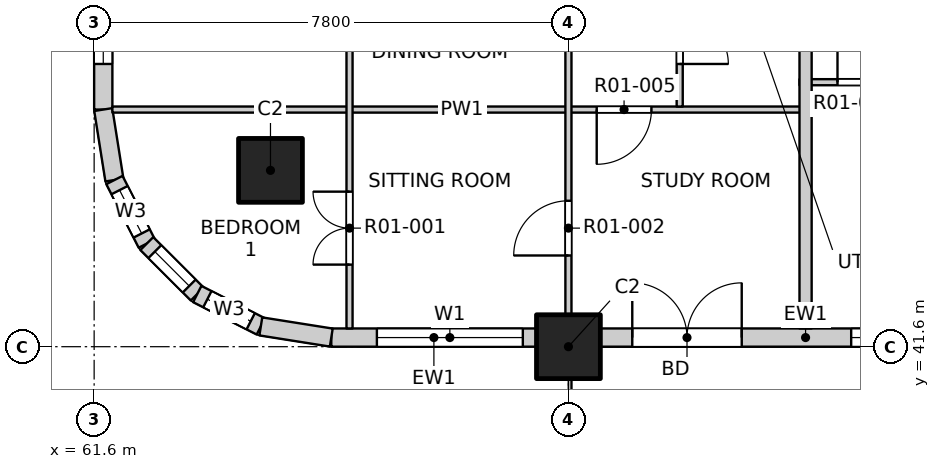
"""IFC4 building model, lengths in metres.
Left out: names, types, materials, properties, quantities, classifications, styles, units other than length and angle.
Written with IfcOpenShell. Run it as: python <this file> out.ifc"""

import sys

from ifc_helpers import new_model, si_unit, direction, frame, frame_2d, origin, origin_2d, place, context, subcontext, project, spatial, rectangle, extrude, element, fill, save


model = new_model("IFC4")
c1 = context("Model", 3, precision=1e-05, world=origin(), true_north=direction((0.0, 1.0)))
c2 = subcontext(c1, "Body", "Model", "MODEL_VIEW")
j1 = project(units=[si_unit("LENGTHUNIT", "METRE"), si_unit("PLANEANGLEUNIT", "RADIAN")], contexts=[c1])
p1 = place(None, origin())
s1 = spatial("IfcSite", under=j1, at=p1, CompositionType="ELEMENT")
p2 = place(p1, origin())
s2 = spatial("IfcBuilding", under=s1, at=p2, CompositionType="ELEMENT")
p3 = place(p2, frame((0.0, 0.0, 26.3)))
s3 = spatial("IfcBuildingStorey", under=s2, at=p3, CompositionType="ELEMENT", Elevation=26.3)
for number, where, z_axis, x_axis in (
    (1, (64.5, 44.5, -0.25), (0.0, 0.0, 1.0), (1.0, 0.0, 0.0)),
    (2, (69.4, 41.6, -0.25), (0.0, 0.0, 1.0), (1.0, 0.0, 0.0)),
):
    element("IfcColumn", number, at=place(p3, frame(where, z_axis=z_axis, x_axis=x_axis)), inside=s3, PredefinedType="COLUMN", context=c2, shape_type="SweptSolid", body=[
        extrude(rectangle(XDim=1.05, YDim=1.05, at=origin_2d()), origin(), (0.0, 0.0, 1.0), 3.4),
    ])
p4 = place(p3, frame((65.5, 41.75, 0.0), z_axis=(0.0, 0.0, 1.0), x_axis=(1.0, 0.0, 0.0)))
e3 = element("IfcWall", 3, at=p4, inside=s3, PredefinedType="SOLIDWALL", context=c2, shape_type="SweptSolid", body=[
    extrude(rectangle(XDim=3.375, YDim=0.3, at=frame_2d((1.688, 0.0))), origin(), (0.0, 0.0, 1.0), 2.7),
])
p5 = place(p4, frame((0.75, 0.0, 0.9)))
e4 = element("IfcOpeningElement", 4, at=p5, cuts=e3, PredefinedType="OPENING", context=c2, shape_type="SweptSolid", body=[
    extrude(rectangle(XDim=2.4, YDim=1.8, at=frame_2d((1.2, 0.9))), frame((0.0, 0.16, 0.0), z_axis=(0.0, -1.0, 0.0), x_axis=(1.0, 0.0, 0.0)), (0.0, 0.0, 1.0), 0.32),
])
p6 = place(p3, frame((69.925, 41.75, 0.0), z_axis=(0.0, 0.0, 1.0), x_axis=(1.0, 0.0, 0.0)))
e5 = element("IfcWall", 5, at=p6, inside=s3, PredefinedType="SOLIDWALL", context=c2, shape_type="SweptSolid", body=[
    extrude(rectangle(XDim=6.75, YDim=0.3, at=frame_2d((3.375, 0.0))), origin(), (0.0, 0.0, 1.0), 2.7),
])
p7 = place(p6, frame((0.525, 0.0, 0.0)))
e6 = element("IfcOpeningElement", 6, at=p7, cuts=e5, PredefinedType="OPENING", context=c2, shape_type="SweptSolid", body=[
    extrude(rectangle(XDim=1.8, YDim=2.4, at=frame_2d((0.9, 1.2))), frame((0.0, 0.16, 0.0), z_axis=(0.0, -1.0, 0.0), x_axis=(1.0, 0.0, 0.0)), (0.0, 0.0, 1.0), 0.32),
])
p8 = place(p6, frame((4.125, 0.0, 0.9)))
e7 = element("IfcOpeningElement", 7, at=p8, cuts=e5, PredefinedType="OPENING", context=c2, shape_type="SweptSolid", body=[
    extrude(rectangle(XDim=2.4, YDim=1.8, at=frame_2d((1.2, 0.9))), frame((0.0, 0.16, 0.0), z_axis=(0.0, -1.0, 0.0), x_axis=(1.0, 0.0, 0.0)), (0.0, 0.0, 1.0), 0.32),
])
p9 = place(p3, frame((61.75, 45.5, 0.0), z_axis=(0.0, 0.0, 1.0), x_axis=(0.0, 1.0, 0.0)))
e8 = element("IfcWall", 8, at=p9, inside=s3, PredefinedType="SOLIDWALL", context=c2, shape_type="SweptSolid", body=[
    extrude(rectangle(XDim=3.375, YDim=0.3, at=frame_2d((1.688, 0.0))), origin(), (0.0, 0.0, 1.0), 2.7),
])
p10 = place(p9, frame((0.75, 0.0, 0.9)))
e9 = element("IfcOpeningElement", 9, at=p10, cuts=e8, PredefinedType="OPENING", context=c2, shape_type="SweptSolid", body=[
    extrude(rectangle(XDim=2.4, YDim=1.8, at=frame_2d((1.2, 0.9))), frame((0.0, 0.16, 0.0), z_axis=(0.0, -1.0, 0.0), x_axis=(1.0, 0.0, 0.0)), (0.0, 0.0, 1.0), 0.32),
])
p11 = place(p3, frame((61.75, 45.5, 0.0), z_axis=(0.0, 0.0, 1.0), x_axis=(0.156496880861, -0.987678452879, 0.0)))
e10 = element("IfcWall", 10, at=p11, inside=s3, PredefinedType="SOLIDWALL", context=c2, shape_type="SweptSolid", body=[
    extrude(rectangle(XDim=1.173, YDim=0.3, at=frame_2d((0.586, 0.0))), origin(), (0.0, 0.0, 1.0), 2.7),
])
p12 = place(p3, frame((61.934, 44.341, 0.0), z_axis=(0.0, 0.0, 1.0), x_axis=(0.454025524128, -0.890988677504, 0.0)))
e11 = element("IfcWall", 11, at=p12, inside=s3, PredefinedType="SOLIDWALL", context=c2, shape_type="SweptSolid", body=[
    extrude(rectangle(XDim=1.173, YDim=0.3, at=frame_2d((0.587, 0.0))), origin(), (0.0, 0.0, 1.0), 2.7),
])
p13 = place(p12, frame((0.187, 0.0, 0.9)))
e12 = element("IfcOpeningElement", 12, at=p13, cuts=e11, PredefinedType="OPENING", context=c2, shape_type="SweptSolid", body=[
    extrude(rectangle(XDim=0.8, YDim=1.2, at=frame_2d((0.4, 0.6))), frame((0.0, 0.16, 0.0), z_axis=(0.0, -1.0, 0.0), x_axis=(1.0, 0.0, 0.0)), (0.0, 0.0, 1.0), 0.32),
])
p14 = place(p3, frame((62.466, 43.296, 0.0), z_axis=(0.0, 0.0, 1.0), x_axis=(0.707106781187, -0.707106781187, 0.0)))
e13 = element("IfcWall", 13, at=p14, inside=s3, PredefinedType="SOLIDWALL", context=c2, shape_type="SweptSolid", body=[
    extrude(rectangle(XDim=1.173, YDim=0.3, at=frame_2d((0.586, 0.0))), origin(), (0.0, 0.0, 1.0), 2.7),
])
p15 = place(p14, frame((0.187, 0.0, 0.9)))
e14 = element("IfcOpeningElement", 14, at=p15, cuts=e13, PredefinedType="OPENING", context=c2, shape_type="SweptSolid", body=[
    extrude(rectangle(XDim=0.8, YDim=1.2, at=frame_2d((0.4, 0.6))), frame((0.0, 0.16, 0.0), z_axis=(0.0, -1.0, 0.0), x_axis=(1.0, 0.0, 0.0)), (0.0, 0.0, 1.0), 0.32),
])
p16 = place(p3, frame((63.296, 42.466, 0.0), z_axis=(0.0, 0.0, 1.0), x_axis=(0.890988677504, -0.454025524128, 0.0)))
e15 = element("IfcWall", 15, at=p16, inside=s3, PredefinedType="SOLIDWALL", context=c2, shape_type="SweptSolid", body=[
    extrude(rectangle(XDim=1.173, YDim=0.3, at=frame_2d((0.587, 0.0))), origin(), (0.0, 0.0, 1.0), 2.7),
])
p17 = place(p16, frame((0.187, 0.0, 0.9)))
e16 = element("IfcOpeningElement", 16, at=p17, cuts=e15, PredefinedType="OPENING", context=c2, shape_type="SweptSolid", body=[
    extrude(rectangle(XDim=0.8, YDim=1.2, at=frame_2d((0.4, 0.6))), frame((0.0, 0.16, 0.0), z_axis=(0.0, -1.0, 0.0), x_axis=(1.0, 0.0, 0.0)), (0.0, 0.0, 1.0), 0.32),
])
p18 = place(p3, frame((64.341, 41.934, 0.0), z_axis=(0.0, 0.0, 1.0), x_axis=(0.987678452879, -0.156496880861, 0.0)))
e17 = element("IfcWall", 17, at=p18, inside=s3, PredefinedType="SOLIDWALL", context=c2, shape_type="SweptSolid", body=[
    extrude(rectangle(XDim=1.173, YDim=0.3, at=frame_2d((0.586, 0.0))), origin(), (0.0, 0.0, 1.0), 2.7),
])
p19 = place(p3, frame((61.9, 45.5, 0.0), z_axis=(0.0, 0.0, 1.0), x_axis=(1.0, 0.0, 0.0)))
e18 = element("IfcWall", 18, at=p19, inside=s3, PredefinedType="PARTITIONING", context=c2, shape_type="SweptSolid", body=[
    extrude(rectangle(XDim=11.5, YDim=0.1, at=frame_2d((5.75, 0.0))), origin(), (0.0, 0.0, 1.0), 3.15),
])
p20 = place(p19, frame((7.965, 0.0, 0.0)))
e19 = element("IfcOpeningElement", 19, at=p20, cuts=e18, PredefinedType="OPENING", context=c2, shape_type="SweptSolid", body=[
    extrude(rectangle(XDim=0.9, YDim=2.1, at=frame_2d((0.45, 1.05))), frame((0.0, 0.06, 0.0), z_axis=(0.0, -1.0, 0.0), x_axis=(1.0, 0.0, 0.0)), (0.0, 0.0, 1.0), 0.12),
])
p21 = place(p3, frame((73.2, 45.95, 0.0), z_axis=(0.0, 0.0, 1.0), x_axis=(1.0, 0.0, 0.0)))
e20 = element("IfcWall", 20, at=p21, inside=s3, PredefinedType="PARTITIONING", context=c2, shape_type="SweptSolid", body=[
    extrude(rectangle(XDim=15.8, YDim=0.1, at=frame_2d((7.9, 0.0))), origin(), (0.0, 0.0, 1.0), 3.15),
])
p22 = place(p21, frame((0.625, 0.0, 0.0)))
e21 = element("IfcOpeningElement", 21, at=p22, cuts=e20, PredefinedType="OPENING", context=c2, shape_type="SweptSolid", body=[
    extrude(rectangle(XDim=0.9, YDim=2.1, at=frame_2d((0.45, 1.05))), frame((0.0, 0.06, 0.0), z_axis=(0.0, -1.0, 0.0), x_axis=(1.0, 0.0, 0.0)), (0.0, 0.0, 1.0), 0.12),
])
p23 = place(p21, frame((2.575, 0.0, 0.0)))
e22 = element("IfcOpeningElement", 22, at=p23, cuts=e20, PredefinedType="OPENING", context=c2, shape_type="SweptSolid", body=[
    extrude(rectangle(XDim=0.9, YDim=2.1, at=frame_2d((0.45, 1.05))), frame((0.0, 0.06, 0.0), z_axis=(0.0, -1.0, 0.0), x_axis=(1.0, 0.0, 0.0)), (0.0, 0.0, 1.0), 0.12),
])
p24 = place(p21, frame((5.35, 0.0, 0.0)))
e23 = element("IfcOpeningElement", 23, at=p24, cuts=e20, PredefinedType="OPENING", context=c2, shape_type="SweptSolid", body=[
    extrude(rectangle(XDim=1.2, YDim=2.1, at=frame_2d((0.6, 1.05))), frame((0.0, 0.06, 0.0), z_axis=(0.0, -1.0, 0.0), x_axis=(1.0, 0.0, 0.0)), (0.0, 0.0, 1.0), 0.12),
])
p25 = place(p21, frame((9.25, 0.0, 0.0)))
e24 = element("IfcOpeningElement", 24, at=p25, cuts=e20, PredefinedType="OPENING", context=c2, shape_type="SweptSolid", body=[
    extrude(rectangle(XDim=1.2, YDim=2.1, at=frame_2d((0.6, 1.05))), frame((0.0, 0.06, 0.0), z_axis=(0.0, -1.0, 0.0), x_axis=(1.0, 0.0, 0.0)), (0.0, 0.0, 1.0), 0.12),
])
p26 = place(p21, frame((12.325, 0.0, 0.0)))
e25 = element("IfcOpeningElement", 25, at=p26, cuts=e20, PredefinedType="OPENING", context=c2, shape_type="SweptSolid", body=[
    extrude(rectangle(XDim=0.9, YDim=2.1, at=frame_2d((0.45, 1.05))), frame((0.0, 0.06, 0.0), z_axis=(0.0, -1.0, 0.0), x_axis=(1.0, 0.0, 0.0)), (0.0, 0.0, 1.0), 0.12),
])
p27 = place(p21, frame((14.275, 0.0, 0.0)))
e26 = element("IfcOpeningElement", 26, at=p27, cuts=e20, PredefinedType="OPENING", context=c2, shape_type="SweptSolid", body=[
    extrude(rectangle(XDim=0.9, YDim=2.1, at=frame_2d((0.45, 1.05))), frame((0.0, 0.06, 0.0), z_axis=(0.0, -1.0, 0.0), x_axis=(1.0, 0.0, 0.0)), (0.0, 0.0, 1.0), 0.12),
])
p28 = place(p3, frame((65.8, 41.9, 0.0), z_axis=(0.0, 0.0, 1.0), x_axis=(0.0, 1.0, 0.0)))
e27 = element("IfcWall", 27, at=p28, inside=s3, PredefinedType="PARTITIONING", context=c2, shape_type="SweptSolid", body=[
    extrude(rectangle(XDim=19.1, YDim=0.1, at=frame_2d((9.55, 0.0))), origin(), (0.0, 0.0, 1.0), 3.15),
])
p29 = place(p28, frame((1.05, 0.0, 0.0)))
e28 = element("IfcOpeningElement", 28, at=p29, cuts=e27, PredefinedType="OPENING", context=c2, shape_type="SweptSolid", body=[
    extrude(rectangle(XDim=1.2, YDim=2.1, at=frame_2d((0.6, 1.05))), frame((0.0, 0.06, 0.0), z_axis=(0.0, -1.0, 0.0), x_axis=(1.0, 0.0, 0.0)), (0.0, 0.0, 1.0), 0.12),
])
p30 = place(p28, frame((4.95, 0.0, 0.0)))
e29 = element("IfcOpeningElement", 29, at=p30, cuts=e27, PredefinedType="OPENING", context=c2, shape_type="SweptSolid", body=[
    extrude(rectangle(XDim=1.2, YDim=2.1, at=frame_2d((0.6, 1.05))), frame((0.0, 0.06, 0.0), z_axis=(0.0, -1.0, 0.0), x_axis=(1.0, 0.0, 0.0)), (0.0, 0.0, 1.0), 0.12),
])
p31 = place(p28, frame((8.85, 0.0, 0.0)))
e30 = element("IfcOpeningElement", 30, at=p31, cuts=e27, PredefinedType="OPENING", context=c2, shape_type="SweptSolid", body=[
    extrude(rectangle(XDim=1.2, YDim=2.1, at=frame_2d((0.6, 1.05))), frame((0.0, 0.06, 0.0), z_axis=(0.0, -1.0, 0.0), x_axis=(1.0, 0.0, 0.0)), (0.0, 0.0, 1.0), 0.12),
])
p32 = place(p28, frame((11.925, 0.0, 0.0)))
e31 = element("IfcOpeningElement", 31, at=p32, cuts=e27, PredefinedType="OPENING", context=c2, shape_type="SweptSolid", body=[
    extrude(rectangle(XDim=0.9, YDim=2.1, at=frame_2d((0.45, 1.05))), frame((0.0, 0.06, 0.0), z_axis=(0.0, -1.0, 0.0), x_axis=(1.0, 0.0, 0.0)), (0.0, 0.0, 1.0), 0.12),
])
p33 = place(p28, frame((13.875, 0.0, 0.0)))
e32 = element("IfcOpeningElement", 32, at=p33, cuts=e27, PredefinedType="OPENING", context=c2, shape_type="SweptSolid", body=[
    extrude(rectangle(XDim=0.9, YDim=2.1, at=frame_2d((0.45, 1.05))), frame((0.0, 0.06, 0.0), z_axis=(0.0, -1.0, 0.0), x_axis=(1.0, 0.0, 0.0)), (0.0, 0.0, 1.0), 0.12),
])
p34 = place(p28, frame((15.825, 0.0, 0.0)))
e33 = element("IfcOpeningElement", 33, at=p34, cuts=e27, PredefinedType="OPENING", context=c2, shape_type="SweptSolid", body=[
    extrude(rectangle(XDim=0.9, YDim=2.1, at=frame_2d((0.45, 1.05))), frame((0.0, 0.06, 0.0), z_axis=(0.0, -1.0, 0.0), x_axis=(1.0, 0.0, 0.0)), (0.0, 0.0, 1.0), 0.12),
])
p35 = place(p28, frame((17.775, 0.0, 0.0)))
e34 = element("IfcOpeningElement", 34, at=p35, cuts=e27, PredefinedType="OPENING", context=c2, shape_type="SweptSolid", body=[
    extrude(rectangle(XDim=0.9, YDim=2.1, at=frame_2d((0.45, 1.05))), frame((0.0, 0.06, 0.0), z_axis=(0.0, -1.0, 0.0), x_axis=(1.0, 0.0, 0.0)), (0.0, 0.0, 1.0), 0.12),
])
p36 = place(p3, frame((69.4, 41.9, 0.0), z_axis=(0.0, 0.0, 1.0), x_axis=(0.0, 1.0, 0.0)))
e35 = element("IfcWall", 35, at=p36, inside=s3, PredefinedType="PARTITIONING", context=c2, shape_type="SweptSolid", body=[
    extrude(rectangle(XDim=7.5, YDim=0.1, at=frame_2d((3.75, 0.0))), origin(), (0.0, 0.0, 1.0), 2.55),
])
p37 = place(p36, frame((1.2, 0.0, 0.0)))
e36 = element("IfcOpeningElement", 36, at=p37, cuts=e35, PredefinedType="OPENING", context=c2, shape_type="SweptSolid", body=[
    extrude(rectangle(XDim=0.9, YDim=2.1, at=frame_2d((0.45, 1.05))), frame((0.0, 0.06, 0.0), z_axis=(0.0, -1.0, 0.0), x_axis=(1.0, 0.0, 0.0)), (0.0, 0.0, 1.0), 0.12),
])
p38 = place(p36, frame((5.1, 0.0, 0.0)))
e37 = element("IfcOpeningElement", 37, at=p38, cuts=e35, PredefinedType="OPENING", context=c2, shape_type="SweptSolid", body=[
    extrude(rectangle(XDim=0.9, YDim=2.1, at=frame_2d((0.45, 1.05))), frame((0.0, 0.06, 0.0), z_axis=(0.0, -1.0, 0.0), x_axis=(1.0, 0.0, 0.0)), (0.0, 0.0, 1.0), 0.12),
])
p39 = place(p3, frame((71.23, 45.55, 0.0), z_axis=(0.0, 0.0, 1.0), x_axis=(0.0, 1.0, 0.0)))
e38 = element("IfcWall", 38, at=p39, inside=s3, PredefinedType="PARTITIONING", context=c2, shape_type="SweptSolid", body=[
    extrude(rectangle(XDim=8.85, YDim=0.1, at=frame_2d((4.425, 0.0))), origin(), (0.0, 0.0, 1.0), 3.15),
])
p40 = place(p39, frame((0.7, 0.0, 0.0)))
e39 = element("IfcOpeningElement", 39, at=p40, cuts=e38, PredefinedType="OPENING", context=c2, shape_type="SweptSolid", body=[
    extrude(rectangle(XDim=0.8, YDim=2.1, at=frame_2d((0.4, 1.05))), frame((0.0, 0.06, 0.0), z_axis=(0.0, -1.0, 0.0), x_axis=(1.0, 0.0, 0.0)), (0.0, 0.0, 1.0), 0.12),
])
p41 = place(p39, frame((2.7, 0.0, 0.0)))
e40 = element("IfcOpeningElement", 40, at=p41, cuts=e38, PredefinedType="OPENING", context=c2, shape_type="SweptSolid", body=[
    extrude(rectangle(XDim=0.9, YDim=2.1, at=frame_2d((0.45, 1.05))), frame((0.0, 0.06, 0.0), z_axis=(0.0, -1.0, 0.0), x_axis=(1.0, 0.0, 0.0)), (0.0, 0.0, 1.0), 0.12),
])
p42 = place(p39, frame((4.925, 0.0, 0.0)))
e41 = element("IfcOpeningElement", 41, at=p42, cuts=e38, PredefinedType="OPENING", context=c2, shape_type="SweptSolid", body=[
    extrude(rectangle(XDim=0.8, YDim=2.1, at=frame_2d((0.4, 1.05))), frame((0.0, 0.06, 0.0), z_axis=(0.0, -1.0, 0.0), x_axis=(1.0, 0.0, 0.0)), (0.0, 0.0, 1.0), 0.12),
])
p43 = place(p39, frame((7.35, 0.0, 0.0)))
e42 = element("IfcOpeningElement", 42, at=p43, cuts=e38, PredefinedType="OPENING", context=c2, shape_type="SweptSolid", body=[
    extrude(rectangle(XDim=0.8, YDim=2.1, at=frame_2d((0.4, 1.05))), frame((0.0, 0.06, 0.0), z_axis=(0.0, -1.0, 0.0), x_axis=(1.0, 0.0, 0.0)), (0.0, 0.0, 1.0), 0.12),
])
p44 = place(p3, frame((73.3, 41.9, 0.0), z_axis=(0.0, 0.0, 1.0), x_axis=(0.0, 1.0, 0.0)))
e43 = element("IfcWall", 43, at=p44, inside=s3, PredefinedType="PARTITIONING", context=c2, shape_type="SweptSolid", body=[
    extrude(rectangle(XDim=11.3, YDim=0.2, at=frame_2d((5.65, 0.0))), origin(), (0.0, 0.0, 1.0), 3.15),
])
p45 = place(p5, origin())
e44 = element("IfcWindow", 44, at=p45, inside=s3, PartitioningType="DOUBLE_PANEL_VERTICAL", PredefinedType="WINDOW", context=c2, shape_type="SweptSolid", body=[
    extrude(rectangle(XDim=2.4, YDim=1.8, at=frame_2d((1.2, 0.9))), frame((0.0, 0.03, 0.0), z_axis=(0.0, -1.0, 0.0), x_axis=(1.0, 0.0, 0.0)), (0.0, 0.0, 1.0), 0.06),
])
fill(e4, e44)
p46 = place(p7, origin())
e45 = element("IfcDoor", 45, at=p46, inside=s3, OperationType="DOUBLE_DOOR_SINGLE_SWING", PredefinedType="DOOR", context=c2, shape_type="SweptSolid", body=[
    extrude(rectangle(XDim=1.8, YDim=2.4, at=frame_2d((0.9, 1.2))), frame((0.0, 0.025, 0.0), z_axis=(0.0, -1.0, 0.0), x_axis=(1.0, 0.0, 0.0)), (0.0, 0.0, 1.0), 0.05),
])
fill(e6, e45)
p47 = place(p8, origin())
e46 = element("IfcWindow", 46, at=p47, inside=s3, PartitioningType="DOUBLE_PANEL_VERTICAL", PredefinedType="WINDOW", context=c2, shape_type="SweptSolid", body=[
    extrude(rectangle(XDim=2.4, YDim=1.8, at=frame_2d((1.2, 0.9))), frame((0.0, 0.03, 0.0), z_axis=(0.0, -1.0, 0.0), x_axis=(1.0, 0.0, 0.0)), (0.0, 0.0, 1.0), 0.06),
])
fill(e7, e46)
p48 = place(p10, origin())
e47 = element("IfcWindow", 47, at=p48, inside=s3, PartitioningType="DOUBLE_PANEL_VERTICAL", PredefinedType="WINDOW", context=c2, shape_type="SweptSolid", body=[
    extrude(rectangle(XDim=2.4, YDim=1.8, at=frame_2d((1.2, 0.9))), frame((0.0, 0.03, 0.0), z_axis=(0.0, -1.0, 0.0), x_axis=(1.0, 0.0, 0.0)), (0.0, 0.0, 1.0), 0.06),
])
fill(e9, e47)
p49 = place(p13, origin())
e48 = element("IfcWindow", 48, at=p49, inside=s3, PartitioningType="SINGLE_PANEL", PredefinedType="WINDOW", context=c2, shape_type="SweptSolid", body=[
    extrude(rectangle(XDim=0.8, YDim=1.2, at=frame_2d((0.4, 0.6))), frame((0.0, 0.03, 0.0), z_axis=(0.0, -1.0, 0.0), x_axis=(1.0, 0.0, 0.0)), (0.0, 0.0, 1.0), 0.06),
])
fill(e12, e48)
p50 = place(p15, origin())
e49 = element("IfcWindow", 49, at=p50, inside=s3, PartitioningType="SINGLE_PANEL", PredefinedType="WINDOW", context=c2, shape_type="SweptSolid", body=[
    extrude(rectangle(XDim=0.8, YDim=1.2, at=frame_2d((0.4, 0.6))), frame((0.0, 0.03, 0.0), z_axis=(0.0, -1.0, 0.0), x_axis=(1.0, 0.0, 0.0)), (0.0, 0.0, 1.0), 0.06),
])
fill(e14, e49)
p51 = place(p17, origin())
e50 = element("IfcWindow", 50, at=p51, inside=s3, PartitioningType="SINGLE_PANEL", PredefinedType="WINDOW", context=c2, shape_type="SweptSolid", body=[
    extrude(rectangle(XDim=0.8, YDim=1.2, at=frame_2d((0.4, 0.6))), frame((0.0, 0.03, 0.0), z_axis=(0.0, -1.0, 0.0), x_axis=(1.0, 0.0, 0.0)), (0.0, 0.0, 1.0), 0.06),
])
fill(e16, e50)
p52 = place(p29, origin())
e51 = element("IfcDoor", 51, at=p52, inside=s3, OperationType="DOUBLE_DOOR_SINGLE_SWING", PredefinedType="DOOR", context=c2, shape_type="SweptSolid", body=[
    extrude(rectangle(XDim=1.2, YDim=2.1, at=frame_2d((0.6, 1.05))), frame((0.0, 0.025, 0.0), z_axis=(0.0, -1.0, 0.0), x_axis=(1.0, 0.0, 0.0)), (0.0, 0.0, 1.0), 0.05),
])
fill(e28, e51)
p53 = place(p37, origin())
e52 = element("IfcDoor", 52, at=p53, inside=s3, OperationType="SINGLE_SWING_LEFT", PredefinedType="DOOR", context=c2, shape_type="SweptSolid", body=[
    extrude(rectangle(XDim=0.9, YDim=2.1, at=frame_2d((0.45, 1.05))), frame((0.0, 0.025, 0.0), z_axis=(0.0, -1.0, 0.0), x_axis=(1.0, 0.0, 0.0)), (0.0, 0.0, 1.0), 0.05),
])
fill(e36, e52)
p54 = place(p20, origin())
e53 = element("IfcDoor", 53, at=p54, inside=s3, OperationType="SINGLE_SWING_RIGHT", PredefinedType="DOOR", context=c2, shape_type="SweptSolid", body=[
    extrude(rectangle(XDim=0.9, YDim=2.1, at=frame_2d((0.45, 1.05))), frame((0.0, 0.025, 0.0), z_axis=(0.0, -1.0, 0.0), x_axis=(1.0, 0.0, 0.0)), (0.0, 0.0, 1.0), 0.05),
])
fill(e19, e53)
p55 = place(p22, origin())
e54 = element("IfcDoor", 54, at=p55, inside=s3, OperationType="SINGLE_SWING_LEFT", PredefinedType="DOOR", context=c2, shape_type="SweptSolid", body=[
    extrude(rectangle(XDim=0.9, YDim=2.1, at=frame_2d((0.45, 1.05))), frame((0.0, 0.025, 0.0), z_axis=(0.0, -1.0, 0.0), x_axis=(1.0, 0.0, 0.0)), (0.0, 0.0, 1.0), 0.05),
])
fill(e21, e54)
p56 = place(p40, origin())
e55 = element("IfcDoor", 55, at=p56, inside=s3, OperationType="SINGLE_SWING_RIGHT", PredefinedType="DOOR", context=c2, shape_type="SweptSolid", body=[
    extrude(rectangle(XDim=0.8, YDim=2.1, at=frame_2d((0.4, 1.05))), frame((0.0, 0.025, 0.0), z_axis=(0.0, -1.0, 0.0), x_axis=(1.0, 0.0, 0.0)), (0.0, 0.0, 1.0), 0.05),
])
fill(e39, e55)
save(model, sys.argv[1])
